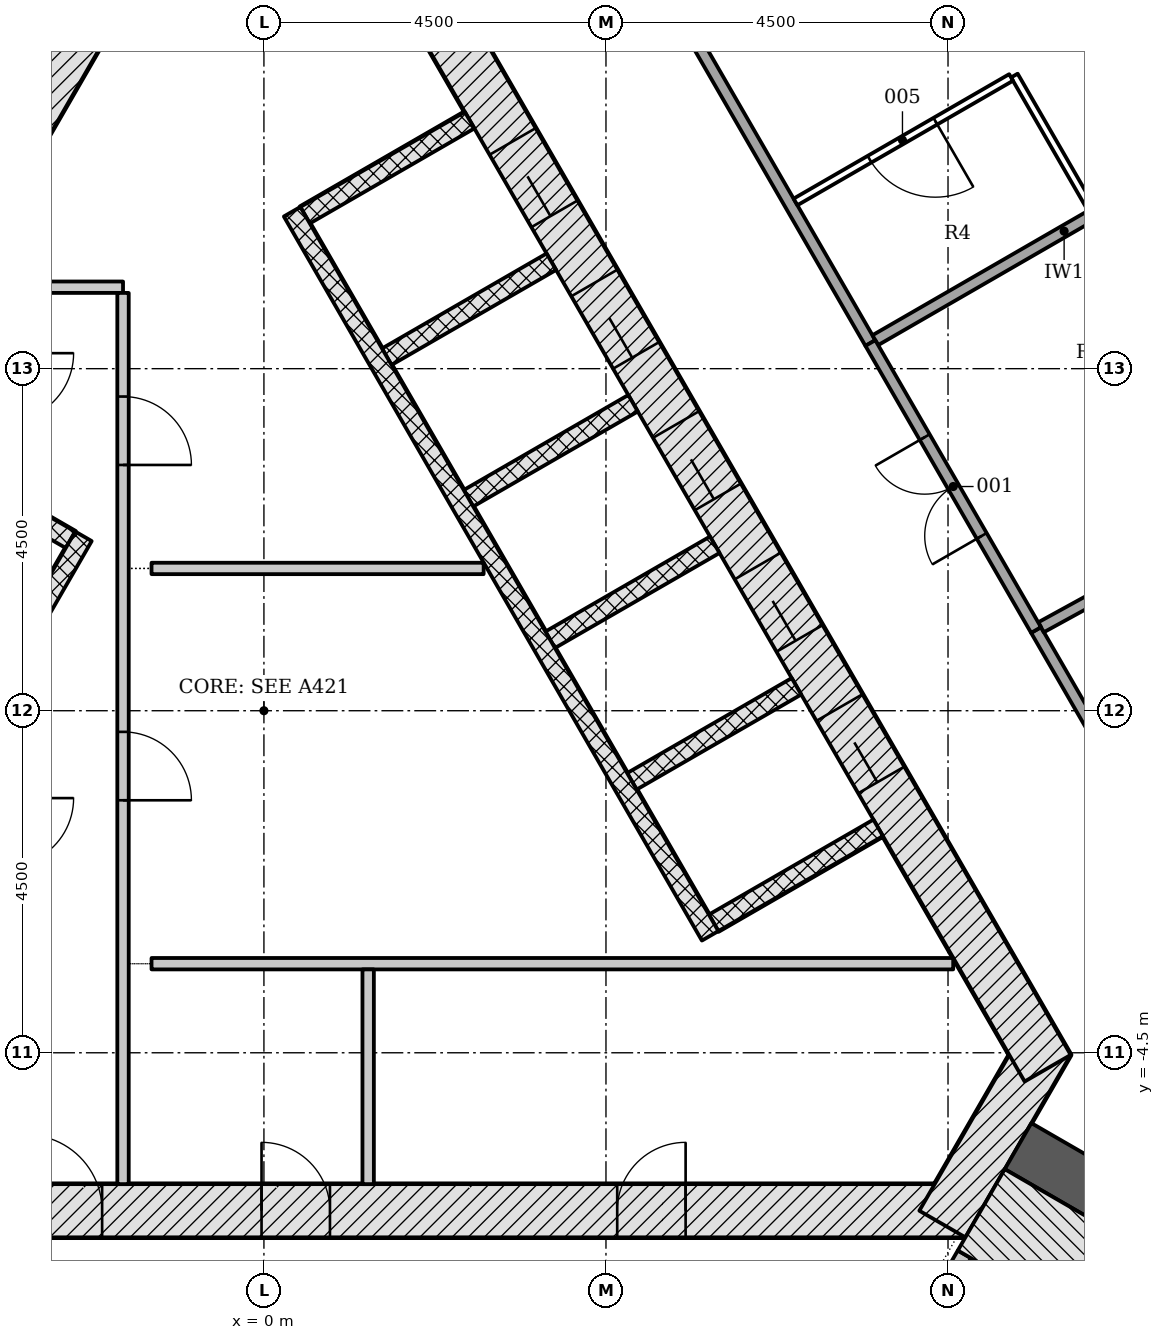
"""IFC4 building model, lengths in metres.
Left out: names, types, materials, properties, quantities, classifications, styles, units other than length and angle.
Written with IfcOpenShell. Run it as: python <this file> out.ifc"""

import sys

from ifc_helpers import new_model, si_unit, direction, frame, frame_2d, origin, place, context, subcontext, project, spatial, rectangle, extrude, element, fill, save


model = new_model("IFC4")
c1 = context("Model", 3, precision=1e-05, world=origin(), true_north=direction((0.0, 1.0)))
c2 = subcontext(c1, "Body", "Model", "MODEL_VIEW")
j1 = project(units=[si_unit("LENGTHUNIT", "METRE"), si_unit("PLANEANGLEUNIT", "RADIAN")], contexts=[c1])
p1 = place(None, origin())
s1 = spatial("IfcSite", under=j1, at=p1, CompositionType="ELEMENT")
p2 = place(p1, origin())
s2 = spatial("IfcBuilding", under=s1, at=p2, CompositionType="ELEMENT")
p3 = place(p2, frame((0.0, 0.0, 192.3)))
s3 = spatial("IfcBuildingStorey", under=s2, at=p3, CompositionType="ELEMENT", Elevation=192.3)
p4 = place(p3, frame((-9.229, -6.578, -0.2), z_axis=(0.0, 0.0, 1.0), x_axis=(1.0, 0.0, 0.0)))
e1 = element("IfcWall", 1, at=p4, inside=s3, PredefinedType="SHEAR", context=c2, shape_type="SweptSolid", body=[
    extrude(rectangle(XDim=18.458, YDim=0.7, at=frame_2d((9.229, 0.0))), origin(), (0.0, 0.0, 1.0), 3.6),
])
p5 = place(p4, frame((6.1, 0.0, 0.2)))
e2 = element("IfcOpeningElement", 2, at=p5, cuts=e1, PredefinedType="OPENING", context=c2, shape_type="SweptSolid", body=[
    extrude(rectangle(XDim=1.0, YDim=2.1, at=frame_2d((0.5, 1.05))), frame((0.0, 0.36, 0.0), z_axis=(0.0, -1.0, 0.0), x_axis=(1.0, 0.0, 0.0)), (0.0, 0.0, 1.0), 0.72),
])
p6 = place(p4, frame((2.615, 0.0, 0.2)))
e3 = element("IfcOpeningElement", 3, at=p6, cuts=e1, PredefinedType="OPENING", context=c2, shape_type="SweptSolid", body=[
    extrude(rectangle(XDim=1.0, YDim=2.1, at=frame_2d((0.5, 1.05))), frame((0.0, 0.36, 0.0), z_axis=(0.0, -1.0, 0.0), x_axis=(1.0, 0.0, 0.0)), (0.0, 0.0, 1.0), 0.72),
])
p7 = place(p4, frame((9.198, 0.0, 0.2)))
e4 = element("IfcOpeningElement", 4, at=p7, cuts=e1, PredefinedType="OPENING", context=c2, shape_type="SweptSolid", body=[
    extrude(rectangle(XDim=0.9, YDim=2.1, at=frame_2d((0.45, 1.05))), frame((0.0, 0.36, 0.0), z_axis=(0.0, -1.0, 0.0), x_axis=(1.0, 0.0, 0.0)), (0.0, 0.0, 1.0), 0.72),
])
p8 = place(p4, frame((13.877, 0.0, 0.2)))
e5 = element("IfcOpeningElement", 5, at=p8, cuts=e1, PredefinedType="OPENING", context=c2, shape_type="SweptSolid", body=[
    extrude(rectangle(XDim=0.9, YDim=2.1, at=frame_2d((0.45, 1.05))), frame((0.0, 0.36, 0.0), z_axis=(0.0, -1.0, 0.0), x_axis=(1.0, 0.0, 0.0)), (0.0, 0.0, 1.0), 0.72),
])
p9 = place(p3, frame((8.926, -6.753, -0.2), z_axis=(0.0, 0.0, 1.0), x_axis=(0.500042739161, 0.866000726912, 0.0)))
e6 = element("IfcWall", 6, at=p9, inside=s3, PredefinedType="SHEAR", context=c2, shape_type="SweptSolid", body=[
    extrude(rectangle(XDim=2.771, YDim=0.7, at=frame_2d((1.386, 0.0))), origin(), (0.0, 0.0, 1.0), 3.6),
])
p10 = place(p3, frame((10.311, -4.703, -0.2), z_axis=(0.0, 0.0, 1.0), x_axis=(-0.500001446645, 0.866024568562, 0.0)))
e7 = element("IfcWall", 7, at=p10, inside=s3, PredefinedType="SHEAR", context=c2, shape_type="SweptSolid", body=[
    extrude(rectangle(XDim=18.458, YDim=0.7, at=frame_2d((9.229, 0.0))), origin(), (0.0, 0.0, 1.0), 3.6),
])
p11 = place(p10, frame((4.379, 0.0, 0.2)))
e8 = element("IfcOpeningElement", 8, at=p11, cuts=e7, PredefinedType="OPENING", context=c2, shape_type="SweptSolid", body=[
    extrude(rectangle(XDim=1.1, YDim=2.1, at=frame_2d((0.55, 1.05))), frame((0.0, 0.36, 0.0), z_axis=(0.0, -1.0, 0.0), x_axis=(1.0, 0.0, 0.0)), (0.0, 0.0, 1.0), 0.72),
])
p12 = place(p10, frame((6.529, 0.0, 0.2)))
e9 = element("IfcOpeningElement", 9, at=p12, cuts=e7, PredefinedType="OPENING", context=c2, shape_type="SweptSolid", body=[
    extrude(rectangle(XDim=1.1, YDim=2.1, at=frame_2d((0.55, 1.05))), frame((0.0, 0.36, 0.0), z_axis=(0.0, -1.0, 0.0), x_axis=(1.0, 0.0, 0.0)), (0.0, 0.0, 1.0), 0.72),
])
p13 = place(p10, frame((8.679, 0.0, 0.2)))
e10 = element("IfcOpeningElement", 10, at=p13, cuts=e7, PredefinedType="OPENING", context=c2, shape_type="SweptSolid", body=[
    extrude(rectangle(XDim=1.1, YDim=2.1, at=frame_2d((0.55, 1.05))), frame((0.0, 0.36, 0.0), z_axis=(0.0, -1.0, 0.0), x_axis=(1.0, 0.0, 0.0)), (0.0, 0.0, 1.0), 0.72),
])
p14 = place(p10, frame((10.829, 0.0, 0.2)))
e11 = element("IfcOpeningElement", 11, at=p14, cuts=e7, PredefinedType="OPENING", context=c2, shape_type="SweptSolid", body=[
    extrude(rectangle(XDim=1.1, YDim=2.1, at=frame_2d((0.55, 1.05))), frame((0.0, 0.36, 0.0), z_axis=(0.0, -1.0, 0.0), x_axis=(1.0, 0.0, 0.0)), (0.0, 0.0, 1.0), 0.72),
])
p15 = place(p10, frame((12.979, 0.0, 0.2)))
e12 = element("IfcOpeningElement", 12, at=p15, cuts=e7, PredefinedType="OPENING", context=c2, shape_type="SweptSolid", body=[
    extrude(rectangle(XDim=1.1, YDim=2.1, at=frame_2d((0.55, 1.05))), frame((0.0, 0.36, 0.0), z_axis=(0.0, -1.0, 0.0), x_axis=(1.0, 0.0, 0.0)), (0.0, 0.0, 1.0), 0.72),
])
p16 = place(p3, frame((-1.083, 11.281, -0.2), z_axis=(0.0, 0.0, 1.0), x_axis=(-0.500001446645, -0.866024568562, 0.0)))
e13 = element("IfcWall", 13, at=p16, inside=s3, PredefinedType="SHEAR", context=c2, shape_type="SweptSolid", body=[
    extrude(rectangle(XDim=18.458, YDim=0.7, at=frame_2d((9.229, 0.0))), origin(), (0.0, 0.0, 1.0), 3.6),
])
p17 = place(p16, frame((8.979, 0.0, 0.2)))
e14 = element("IfcOpeningElement", 14, at=p17, cuts=e13, PredefinedType="OPENING", context=c2, shape_type="SweptSolid", body=[
    extrude(rectangle(XDim=1.2, YDim=2.1, at=frame_2d((0.6, 1.05))), frame((0.0, 0.36, 0.0), z_axis=(0.0, -1.0, 0.0), x_axis=(1.0, 0.0, 0.0)), (0.0, 0.0, 1.0), 0.72),
])
p18 = place(p16, frame((11.029, 0.0, 0.2)))
e15 = element("IfcOpeningElement", 15, at=p18, cuts=e13, PredefinedType="OPENING", context=c2, shape_type="SweptSolid", body=[
    extrude(rectangle(XDim=1.2, YDim=2.1, at=frame_2d((0.6, 1.05))), frame((0.0, 0.36, 0.0), z_axis=(0.0, -1.0, 0.0), x_axis=(1.0, 0.0, 0.0)), (0.0, 0.0, 1.0), 0.72),
])
p19 = place(p3, frame((9.922, -5.728, -0.2), z_axis=(0.0, 0.0, 1.0), x_axis=(0.866026421479, -0.499998237297, 0.0)))
e16 = element("IfcWall", 16, at=p19, inside=s3, PredefinedType="SHEAR", context=c2, shape_type="SweptSolid", body=[
    extrude(rectangle(XDim=9.145, YDim=0.7, at=frame_2d((4.572, 0.0))), origin(), (0.0, 0.0, 1.0), 3.6),
])
for number, where, z_axis, x_axis in (
    (17, (8.081, -1.541, -0.2), (0.0, 0.0, 1.0), (-0.866, -0.5, 0.0)),
    (18, (7.006, 0.321, -0.2), (0.0, 0.0, 1.0), (-0.866, -0.5, 0.0)),
):
    element("IfcWall", number, at=place(p3, frame(where, z_axis=z_axis, x_axis=x_axis)), inside=s3, PredefinedType="PARTITIONING", context=c2, shape_type="SweptSolid", body=[
        extrude(rectangle(XDim=2.5, YDim=0.25, at=frame_2d((1.25, 0.0))), origin(), (0.0, 0.0, 1.0), 3.6),
    ])
p20 = place(p3, frame((5.931, 2.183, -0.2), z_axis=(0.0, 0.0, 1.0), x_axis=(-0.866047370643, -0.499961950354, 0.0)))
e19 = element("IfcWall", 19, at=p20, inside=s3, PredefinedType="PARTITIONING", context=c2, shape_type="SweptSolid", body=[
    extrude(rectangle(XDim=2.5, YDim=0.25, at=frame_2d((1.25, 0.0))), origin(), (0.0, 0.0, 1.0), 3.6),
])
for number, where, z_axis, x_axis in (
    (20, (4.856, 4.045, -0.2), (0.0, 0.0, 1.0), (-0.866, -0.5, 0.0)),
    (21, (3.781, 5.907, -0.2), (0.0, 0.0, 1.0), (-0.866, -0.5, 0.0)),
    (22, (2.706, 7.769, -0.2), (0.0, 0.0, 1.0), (-0.866, -0.5, 0.0)),
):
    element("IfcWall", number, at=place(p3, frame(where, z_axis=z_axis, x_axis=x_axis)), inside=s3, PredefinedType="PARTITIONING", context=c2, shape_type="SweptSolid", body=[
        extrude(rectangle(XDim=2.5, YDim=0.25, at=frame_2d((1.25, 0.0))), origin(), (0.0, 0.0, 1.0), 3.6),
    ])
p21 = place(p3, frame((5.87, -2.961, 0.0), z_axis=(0.0, 0.0, 1.0), x_axis=(-0.50000615651, 0.866021849293, 0.0)))
e23 = element("IfcWall", 23, at=p21, inside=s3, PredefinedType="PARTITIONING", context=c2, shape_type="SweptSolid", body=[
    extrude(rectangle(XDim=11.0, YDim=0.25, at=frame_2d((5.5, 0.0))), origin(), (0.0, 0.0, 1.0), 3.4),
])
p22 = place(p3, frame((-5.056, 3.699, -0.2), z_axis=(0.0, 0.0, 1.0), x_axis=(0.866032775405, -0.499987231761, 0.0)))
e24 = element("IfcWall", 24, at=p22, inside=s3, PredefinedType="PARTITIONING", context=c2, shape_type="SweptSolid", body=[
    extrude(rectangle(XDim=2.9, YDim=0.25, at=frame_2d((1.45, 0.0))), origin(), (0.0, 0.0, 1.0), 3.6),
])
p23 = place(p3, frame((-2.374, 2.294, 0.0), z_axis=(0.0, 0.0, 1.0), x_axis=(-0.500003174267, -0.866023571113, 0.0)))
e25 = element("IfcWall", 25, at=p23, inside=s3, PredefinedType="PARTITIONING", context=c2, shape_type="SweptSolid", body=[
    extrude(rectangle(XDim=6.7, YDim=0.25, at=frame_2d((3.35, 0.0))), origin(), (0.0, 0.0, 1.0), 3.4),
])
p24 = place(p3, frame((-3.329, 5.572, 0.0), z_axis=(0.0, 0.0, 1.0), x_axis=(1.0, 0.0, 0.0)))
e26 = element("IfcWall", 26, at=p24, inside=s3, PredefinedType="PARTITIONING", context=c2, shape_type="SweptSolid", body=[
    extrude(rectangle(XDim=1.475, YDim=0.15, at=frame_2d((0.737, 0.0))), origin(), (0.0, 0.0, 1.0), 3.4),
])
p25 = place(p3, frame((-1.854, 5.497, 0.0), z_axis=(0.0, 0.0, 1.0), x_axis=(0.0, -1.0, 0.0)))
e27 = element("IfcWall", 27, at=p25, inside=s3, PredefinedType="PARTITIONING", context=c2, shape_type="SweptSolid", body=[
    extrude(rectangle(XDim=11.725, YDim=0.15, at=frame_2d((5.863, 0.0))), origin(), (0.0, 0.0, 1.0), 3.4),
])
p26 = place(p25, frame((5.775, 0.0, 0.0)))
e28 = element("IfcOpeningElement", 28, at=p26, cuts=e27, PredefinedType="OPENING", context=c2, shape_type="SweptSolid", body=[
    extrude(rectangle(XDim=0.9, YDim=2.1, at=frame_2d((0.45, 1.05))), frame((0.0, 0.085, 0.0), z_axis=(0.0, -1.0, 0.0), x_axis=(1.0, 0.0, 0.0)), (0.0, 0.0, 1.0), 0.17),
])
p27 = place(p25, frame((1.364, 0.0, 0.0)))
e29 = element("IfcOpeningElement", 29, at=p27, cuts=e27, PredefinedType="OPENING", context=c2, shape_type="SweptSolid", body=[
    extrude(rectangle(XDim=0.9, YDim=2.1, at=frame_2d((0.45, 1.05))), frame((0.0, 0.085, 0.0), z_axis=(0.0, -1.0, 0.0), x_axis=(1.0, 0.0, 0.0)), (0.0, 0.0, 1.0), 0.17),
])
p28 = place(p3, frame((-1.479, -3.328, 0.0), z_axis=(0.0, 0.0, 1.0), x_axis=(1.0, 0.0, 0.0)))
e30 = element("IfcWall", 30, at=p28, inside=s3, PredefinedType="PARTITIONING", context=c2, shape_type="SweptSolid", body=[
    extrude(rectangle(XDim=10.547, YDim=0.15, at=frame_2d((5.273, 0.0))), origin(), (0.0, 0.0, 1.0), 3.4),
])
p29 = place(p3, frame((-1.479, 1.872, 0.0), z_axis=(0.0, 0.0, 1.0), x_axis=(1.0, 0.0, 0.0)))
e31 = element("IfcWall", 31, at=p29, inside=s3, PredefinedType="PARTITIONING", context=c2, shape_type="SweptSolid", body=[
    extrude(rectangle(XDim=4.369, YDim=0.15, at=frame_2d((2.185, 0.0))), origin(), (0.0, 0.0, 1.0), 3.4),
])
p30 = place(p3, frame((1.371, -3.403, 0.0), z_axis=(0.0, 0.0, 1.0), x_axis=(0.0, -1.0, 0.0)))
e32 = element("IfcWall", 32, at=p30, inside=s3, PredefinedType="PARTITIONING", context=c2, shape_type="SweptSolid", body=[
    extrude(rectangle(XDim=2.825, YDim=0.15, at=frame_2d((1.413, 0.0))), origin(), (0.0, 0.0, 1.0), 3.4),
])
p31 = place(p3, frame((7.44, -10.226, -0.2), z_axis=(0.0, 0.0, 1.0), x_axis=(0.500022077904, 0.866012656725, 0.0)))
e33 = element("IfcWall", 33, at=p31, inside=s3, PredefinedType="SHEAR", context=c2, shape_type="SweptSolid", body=[
    extrude(rectangle(XDim=3.55, YDim=0.2, at=frame_2d((1.775, 0.0))), origin(), (0.0, 0.0, 1.0), 3.6),
])
p32 = place(p31, frame((1.175, 0.0, 0.2)))
e34 = element("IfcOpeningElement", 34, at=p32, cuts=e33, PredefinedType="OPENING", context=c2, shape_type="SweptSolid", body=[
    extrude(rectangle(XDim=1.2, YDim=2.1, at=frame_2d((0.6, 1.05))), frame((0.0, 0.11, 0.0), z_axis=(0.0, -1.0, 0.0), x_axis=(1.0, 0.0, 0.0)), (0.0, 0.0, 1.0), 0.22),
])
p33 = place(p3, frame((9.438, -6.566, -0.2), z_axis=(0.0, 0.0, 1.0), x_axis=(0.866026919366, -0.499997374926, 0.0)))
e35 = element("IfcWall", 35, at=p33, inside=s3, PredefinedType="SHEAR", context=c2, shape_type="SweptSolid", body=[
    extrude(rectangle(XDim=7.2, YDim=1.236, at=frame_2d((3.6, 0.0))), origin(), (0.0, 0.0, 1.0), 3.6),
])
p34 = place(p3, frame((15.807, -8.722, 0.0), z_axis=(0.0, 0.0, 1.0), x_axis=(-0.500004300164, 0.866022921069, 0.0)))
e36 = element("IfcWall", 36, at=p34, inside=s3, PredefinedType="PARTITIONING", context=c2, shape_type="SweptSolid", body=[
    extrude(rectangle(XDim=11.297, YDim=0.15, at=frame_2d((5.649, 0.0))), origin(), (0.0, 0.0, 1.0), 2.852),
])
p35 = place(p3, frame((7.979, 4.837, 0.0), z_axis=(0.0, 0.0, 1.0), x_axis=(-0.500014427086, 0.866017074142, 0.0)))
e37 = element("IfcWall", 37, at=p35, inside=s3, PredefinedType="PARTITIONING", context=c2, shape_type="SweptSolid", body=[
    extrude(rectangle(XDim=7.528, YDim=0.15, at=frame_2d((3.764, 0.0))), origin(), (0.0, 0.0, 1.0), 2.852),
])
p36 = place(p3, frame((15.216, 3.837, 0.0), z_axis=(0.0, 0.0, 1.0), x_axis=(-0.876645576733, -0.48113670905, 0.0)))
e38 = element("IfcWall", 38, at=p36, inside=s3, PredefinedType="PARTITIONING", context=c2, shape_type="SweptSolid", body=[
    extrude(rectangle(XDim=5.694, YDim=0.15, at=frame_2d((2.847, 0.0))), origin(), (0.0, 0.0, 1.0), 3.4),
])
p37 = place(p36, frame((2.385, 0.0, 0.0)))
e39 = element("IfcOpeningElement", 39, at=p37, cuts=e38, PredefinedType="OPENING", context=c2, shape_type="SweptSolid", body=[
    extrude(rectangle(XDim=1.0, YDim=2.1, at=frame_2d((0.5, 1.05))), frame((0.0, 0.085, 0.0), z_axis=(0.0, -1.0, 0.0), x_axis=(1.0, 0.0, 0.0)), (0.0, 0.0, 1.0), 0.17),
])
p38 = place(p3, frame((13.012, 7.743, 0.0), z_axis=(0.0, 0.0, 1.0), x_axis=(-0.866026840724, -0.499997511139, 0.0)))
e40 = element("IfcWall", 40, at=p38, inside=s3, PredefinedType="PARTITIONING", context=c2, shape_type="SweptSolid", body=[
    extrude(rectangle(XDim=5.737, YDim=0.15, at=frame_2d((2.868, 0.0))), origin(), (0.0, 0.0, 1.0), 3.4),
])
p39 = place(p38, frame((0.706, 0.0, 0.0)))
e41 = element("IfcOpeningElement", 41, at=p39, cuts=e40, PredefinedType="OPENING", context=c2, shape_type="SweptSolid", body=[
    extrude(rectangle(XDim=1.0, YDim=2.1, at=frame_2d((0.5, 1.05))), frame((0.0, 0.085, 0.0), z_axis=(0.0, -1.0, 0.0), x_axis=(1.0, 0.0, 0.0)), (0.0, 0.0, 1.0), 0.17),
])
p40 = place(p3, frame((10.158, 1.062, 0.0), z_axis=(0.0, 0.0, 1.0), x_axis=(-0.499969679245, 0.866042908773, 0.0)))
e42 = element("IfcWall", 42, at=p40, inside=s3, PredefinedType="PARTITIONING", context=c2, shape_type="SweptSolid", body=[
    extrude(rectangle(XDim=4.36, YDim=0.15, at=frame_2d((2.18, 0.0))), origin(), (0.0, 0.0, 1.0), 2.852),
])
p41 = place(p40, frame((1.43, 0.0, 0.0)))
e43 = element("IfcOpeningElement", 43, at=p41, cuts=e42, PredefinedType="OPENING", context=c2, shape_type="SweptSolid", body=[
    extrude(rectangle(XDim=1.5, YDim=2.1, at=frame_2d((0.75, 1.05))), frame((0.0, 0.085, 0.0), z_axis=(0.0, -1.0, 0.0), x_axis=(1.0, 0.0, 0.0)), (0.0, 0.0, 1.0), 0.17),
])
p42 = place(p3, frame((10.885, 6.602, 0.0), z_axis=(0.0, 0.0, 1.0), x_axis=(-0.499990325971, 0.866030989016, 0.0)))
e44 = element("IfcWall", 44, at=p42, inside=s3, PredefinedType="PARTITIONING", context=c2, shape_type="SweptSolid", body=[
    extrude(rectangle(XDim=2.025, YDim=0.1, at=frame_2d((1.012, 0.0))), origin(), (0.0, 0.0, 1.0), 3.4),
])
p43 = place(p3, frame((9.83, 8.331, 0.0), z_axis=(0.0, 0.0, 1.0), x_axis=(-0.865995643347, -0.500051543047, 0.0)))
e45 = element("IfcWall", 45, at=p43, inside=s3, PredefinedType="PARTITIONING", context=c2, shape_type="SweptSolid", body=[
    extrude(rectangle(XDim=3.275, YDim=0.1, at=frame_2d((1.638, 0.0))), origin(), (0.0, 0.0, 1.0), 3.4),
])
p44 = place(p43, frame((1.15, 0.0, 0.0)))
e46 = element("IfcOpeningElement", 46, at=p44, cuts=e45, PredefinedType="OPENING", context=c2, shape_type="SweptSolid", body=[
    extrude(rectangle(XDim=1.0, YDim=2.1, at=frame_2d((0.5, 1.05))), frame((0.0, 0.06, 0.0), z_axis=(0.0, -1.0, 0.0), x_axis=(1.0, 0.0, 0.0)), (0.0, 0.0, 1.0), 0.12),
])
p45 = place(p3, frame((-0.35, 18.85, 0.0), z_axis=(0.0, 0.0, 1.0), x_axis=(-0.500000553364, -0.866025084299, 0.0)))
e47 = element("IfcWall", 47, at=p45, inside=s3, PredefinedType="PARTITIONING", context=c2, shape_type="SweptSolid", body=[
    extrude(rectangle(XDim=11.981, YDim=0.15, at=frame_2d((5.991, 0.0))), origin(), (0.0, 0.0, 1.0), 2.852),
])
p46 = place(p11, origin())
e48 = element("IfcDoor", 48, at=p46, inside=s3, OperationType="DOUBLE_DOOR_SLIDING", PredefinedType="DOOR", context=c2, shape_type="SweptSolid", body=[
    extrude(rectangle(XDim=1.1, YDim=2.1, at=frame_2d((0.55, 1.05))), frame((0.0, 0.025, 0.0), z_axis=(0.0, -1.0, 0.0), x_axis=(1.0, 0.0, 0.0)), (0.0, 0.0, 1.0), 0.05),
])
fill(e8, e48)
p47 = place(p12, origin())
e49 = element("IfcDoor", 49, at=p47, inside=s3, OperationType="DOUBLE_DOOR_SLIDING", PredefinedType="DOOR", context=c2, shape_type="SweptSolid", body=[
    extrude(rectangle(XDim=1.1, YDim=2.1, at=frame_2d((0.55, 1.05))), frame((0.0, 0.025, 0.0), z_axis=(0.0, -1.0, 0.0), x_axis=(1.0, 0.0, 0.0)), (0.0, 0.0, 1.0), 0.05),
])
fill(e9, e49)
p48 = place(p13, origin())
e50 = element("IfcDoor", 50, at=p48, inside=s3, OperationType="DOUBLE_DOOR_SLIDING", PredefinedType="DOOR", context=c2, shape_type="SweptSolid", body=[
    extrude(rectangle(XDim=1.1, YDim=2.1, at=frame_2d((0.55, 1.05))), frame((0.0, 0.025, 0.0), z_axis=(0.0, -1.0, 0.0), x_axis=(1.0, 0.0, 0.0)), (0.0, 0.0, 1.0), 0.05),
])
fill(e10, e50)
p49 = place(p14, origin())
e51 = element("IfcDoor", 51, at=p49, inside=s3, OperationType="DOUBLE_DOOR_SLIDING", PredefinedType="DOOR", context=c2, shape_type="SweptSolid", body=[
    extrude(rectangle(XDim=1.1, YDim=2.1, at=frame_2d((0.55, 1.05))), frame((0.0, 0.025, 0.0), z_axis=(0.0, -1.0, 0.0), x_axis=(1.0, 0.0, 0.0)), (0.0, 0.0, 1.0), 0.05),
])
fill(e11, e51)
p50 = place(p15, origin())
e52 = element("IfcDoor", 52, at=p50, inside=s3, OperationType="DOUBLE_DOOR_SLIDING", PredefinedType="DOOR", context=c2, shape_type="SweptSolid", body=[
    extrude(rectangle(XDim=1.1, YDim=2.1, at=frame_2d((0.55, 1.05))), frame((0.0, 0.025, 0.0), z_axis=(0.0, -1.0, 0.0), x_axis=(1.0, 0.0, 0.0)), (0.0, 0.0, 1.0), 0.05),
])
fill(e12, e52)
p51 = place(p5, origin())
e53 = element("IfcDoor", 53, at=p51, inside=s3, OperationType="SINGLE_SWING_LEFT", PredefinedType="DOOR", context=c2, shape_type="SweptSolid", body=[
    extrude(rectangle(XDim=1.0, YDim=2.1, at=frame_2d((0.5, 1.05))), frame((0.0, 0.075, 0.0), z_axis=(0.0, -1.0, 0.0), x_axis=(1.0, 0.0, 0.0)), (0.0, 0.0, 1.0), 0.15),
])
fill(e2, e53)
p52 = place(p7, origin())
e54 = element("IfcDoor", 54, at=p52, inside=s3, OperationType="SINGLE_SWING_LEFT", PredefinedType="DOOR", context=c2, shape_type="SweptSolid", body=[
    extrude(rectangle(XDim=0.9, YDim=2.1, at=frame_2d((0.45, 1.05))), frame((0.0, 0.075, 0.0), z_axis=(0.0, -1.0, 0.0), x_axis=(1.0, 0.0, 0.0)), (0.0, 0.0, 1.0), 0.15),
])
fill(e4, e54)
p53 = place(p8, origin())
e55 = element("IfcDoor", 55, at=p53, inside=s3, OperationType="SINGLE_SWING_RIGHT", PredefinedType="DOOR", context=c2, shape_type="SweptSolid", body=[
    extrude(rectangle(XDim=0.9, YDim=2.1, at=frame_2d((0.45, 1.05))), frame((0.0, 0.075, 0.0), z_axis=(0.0, -1.0, 0.0), x_axis=(1.0, 0.0, 0.0)), (0.0, 0.0, 1.0), 0.15),
])
fill(e5, e55)
p54 = place(p26, origin())
e56 = element("IfcDoor", 56, at=p54, inside=s3, OperationType="SINGLE_SWING_RIGHT", PredefinedType="DOOR", context=c2, shape_type="SweptSolid", body=[
    extrude(rectangle(XDim=0.9, YDim=2.1, at=frame_2d((0.45, 1.05))), frame((0.0, 0.025, 0.0), z_axis=(0.0, -1.0, 0.0), x_axis=(1.0, 0.0, 0.0)), (0.0, 0.0, 1.0), 0.05),
])
fill(e28, e56)
p55 = place(p27, origin())
e57 = element("IfcDoor", 57, at=p55, inside=s3, OperationType="SINGLE_SWING_RIGHT", PredefinedType="DOOR", context=c2, shape_type="SweptSolid", body=[
    extrude(rectangle(XDim=0.9, YDim=2.1, at=frame_2d((0.45, 1.05))), frame((0.0, 0.025, 0.0), z_axis=(0.0, -1.0, 0.0), x_axis=(1.0, 0.0, 0.0)), (0.0, 0.0, 1.0), 0.05),
])
fill(e29, e57)
p56 = place(p41, origin())
e58 = element("IfcDoor", 58, at=p56, inside=s3, OperationType="DOUBLE_DOOR_SINGLE_SWING", PredefinedType="DOOR", context=c2, shape_type="SweptSolid", body=[
    extrude(rectangle(XDim=1.5, YDim=2.1, at=frame_2d((0.75, 1.05))), frame((0.0, 0.025, 0.0), z_axis=(0.0, -1.0, 0.0), x_axis=(1.0, 0.0, 0.0)), (0.0, 0.0, 1.0), 0.05),
])
fill(e43, e58)
p57 = place(p44, origin())
e59 = element("IfcDoor", 59, at=p57, inside=s3, OperationType="SINGLE_SWING_LEFT", PredefinedType="DOOR", context=c2, shape_type="SweptSolid", body=[
    extrude(rectangle(XDim=1.0, YDim=2.1, at=frame_2d((0.5, 1.05))), frame((0.0, 0.025, 0.0), z_axis=(0.0, -1.0, 0.0), x_axis=(1.0, 0.0, 0.0)), (0.0, 0.0, 1.0), 0.05),
])
fill(e46, e59)
save(model, sys.argv[1])
